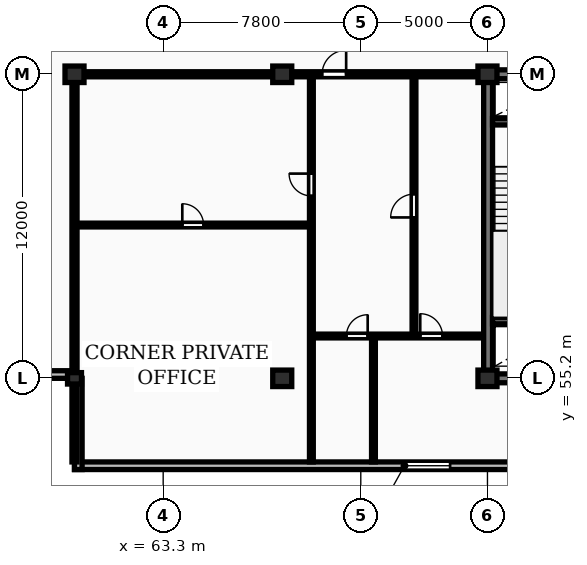
"""IFC4 building model, lengths in metres.
Left out: names, types, materials, properties, quantities, classifications, styles, units other than length and angle.
Written with IfcOpenShell. Run it as: python <this file> out.ifc"""

import sys

from ifc_helpers import new_model, si_unit, direction, frame, frame_2d, origin, origin_2d, place, context, subcontext, project, spatial, rectangle, extrude, element, fill, save


model = new_model("IFC4")
c1 = context("Model", 3, precision=1e-05, world=origin(), true_north=direction((0.0, 1.0)))
c2 = subcontext(c1, "Body", "Model", "MODEL_VIEW")
j1 = project(units=[si_unit("LENGTHUNIT", "METRE"), si_unit("PLANEANGLEUNIT", "RADIAN")], contexts=[c1])
p1 = place(None, origin())
s1 = spatial("IfcSite", under=j1, at=p1, CompositionType="ELEMENT")
p2 = place(p1, origin())
s2 = spatial("IfcBuilding", under=s1, at=p2, CompositionType="ELEMENT")
p3 = place(p2, frame((0.0, 0.0, 235.55)))
s3 = spatial("IfcBuildingStorey", under=s2, at=p3, CompositionType="ELEMENT", Elevation=235.55)
p4 = place(p3, frame((59.8, 55.2, 0.0), z_axis=(0.0, 0.0, 1.0), x_axis=(1.0, 0.0, 0.0)))
e1 = element("IfcColumn", 1, at=p4, inside=s3, PredefinedType="PILASTER", context=c2, shape_type="SweptSolid", body=[
    extrude(rectangle(XDim=0.55, YDim=0.45, at=origin_2d()), origin(), (0.0, 0.0, 1.0), 3.45),
])
for number, where, z_axis, x_axis in (
    (2, (59.8, 67.2, 0.0), (0.0, 0.0, 1.0), (1.0, 0.0, 0.0)),
    (3, (68.0, 55.2, 0.0), (0.0, 0.0, 1.0), (1.0, 0.0, 0.0)),
    (4, (68.0, 67.2, 0.0), (0.0, 0.0, 1.0), (1.0, 0.0, 0.0)),
    (5, (76.1, 55.2, 0.0), (0.0, 0.0, 1.0), (1.0, 0.0, 0.0)),
    (6, (76.1, 67.2, 0.0), (0.0, 0.0, 1.0), (1.0, 0.0, 0.0)),
):
    element("IfcColumn", number, at=place(p3, frame(where, z_axis=z_axis, x_axis=x_axis)), inside=s3, PredefinedType="COLUMN", context=c2, shape_type="SweptSolid", body=[
        extrude(rectangle(XDim=0.75, YDim=0.65, at=origin_2d()), origin(), (0.0, 0.0, 1.0), 3.45),
    ])
p5 = place(p3, frame((59.8, 51.75, 0.0), z_axis=(0.0, 0.0, 1.0), x_axis=(1.0, 0.0, 0.0)))
e7 = element("IfcWall", 7, at=p5, inside=s3, PredefinedType="STANDARD", context=c2, shape_type="SweptSolid", body=[
    extrude(rectangle(XDim=68.6, YDim=0.3, at=frame_2d((34.3, 0.0))), origin(), (0.0, 0.0, 1.0), 3.17),
])
p6 = place(p5, frame((13.025, 0.0, 0.85)))
e8 = element("IfcOpeningElement", 8, at=p6, cuts=e7, PredefinedType="OPENING", context=c2, shape_type="SweptSolid", body=[
    extrude(rectangle(XDim=1.8, YDim=1.8, at=frame_2d((0.9, 0.9))), frame((0.0, 0.16, 0.0), z_axis=(0.0, -1.0, 0.0), x_axis=(1.0, 0.0, 0.0)), (0.0, 0.0, 1.0), 0.32),
])
p7 = place(p5, frame((56.375, 0.0, 0.85)))
e9 = element("IfcOpeningElement", 9, at=p7, cuts=e7, PredefinedType="OPENING", context=c2, shape_type="SweptSolid", body=[
    extrude(rectangle(XDim=1.8, YDim=1.8, at=frame_2d((0.9, 0.9))), frame((0.0, 0.16, 0.0), z_axis=(0.0, -1.0, 0.0), x_axis=(1.0, 0.0, 0.0)), (0.0, 0.0, 1.0), 0.32),
])
p8 = place(p3, frame((56.2, 55.35, 0.0), z_axis=(0.0, 0.0, 1.0), x_axis=(1.0, 0.0, 0.0)))
e10 = element("IfcWall", 10, at=p8, inside=s3, PredefinedType="STANDARD", context=c2, shape_type="SweptSolid", body=[
    extrude(rectangle(XDim=3.6, YDim=0.3, at=frame_2d((1.8, 0.0))), origin(), (0.0, 0.0, 1.0), 3.17),
])
p9 = place(p3, frame((59.95, 55.2, 0.0), z_axis=(0.0, 0.0, 1.0), x_axis=(0.0, -1.0, 0.0)))
e11 = element("IfcWall", 11, at=p9, inside=s3, PredefinedType="STANDARD", context=c2, shape_type="SweptSolid", body=[
    extrude(rectangle(XDim=3.6, YDim=0.3, at=frame_2d((1.8, 0.0))), origin(), (0.0, 0.0, 1.0), 3.17),
])
p10 = place(p3, frame((75.95, 55.2, 0.0), z_axis=(0.0, 0.0, 1.0), x_axis=(1.0, 0.0, 0.0)))
e12 = element("IfcWall", 12, at=p10, inside=s3, PredefinedType="SHEAR", context=c2, shape_type="SweptSolid", body=[
    extrude(rectangle(XDim=36.3, YDim=0.35, at=frame_2d((18.15, 0.0))), origin(), (0.0, 0.0, 1.0), 3.45),
])
p11 = place(p3, frame((76.125, 55.375, 0.0), z_axis=(0.0, 0.0, 1.0), x_axis=(0.0, 1.0, 0.0)))
e13 = element("IfcWall", 13, at=p11, inside=s3, PredefinedType="SHEAR", context=c2, shape_type="SweptSolid", body=[
    extrude(rectangle(XDim=11.65, YDim=0.35, at=frame_2d((5.825, 0.0))), origin(), (0.0, 0.0, 1.0), 3.45),
])
p12 = place(p3, frame((75.95, 67.2, 0.0), z_axis=(0.0, 0.0, 1.0), x_axis=(1.0, 0.0, 0.0)))
e14 = element("IfcWall", 14, at=p12, inside=s3, PredefinedType="SHEAR", context=c2, shape_type="SweptSolid", body=[
    extrude(rectangle(XDim=36.3, YDim=0.35, at=frame_2d((18.15, 0.0))), origin(), (0.0, 0.0, 1.0), 3.45),
])
p13 = place(p12, frame((5.25, 0.0, 0.0)))
e15 = element("IfcOpeningElement", 15, at=p13, cuts=e14, PredefinedType="OPENING", context=c2, shape_type="SweptSolid", body=[
    extrude(rectangle(XDim=1.0, YDim=2.15, at=frame_2d((0.5, 1.075))), frame((0.0, 0.185, 0.0), z_axis=(0.0, -1.0, 0.0), x_axis=(1.0, 0.0, 0.0)), (0.0, 0.0, 1.0), 0.37),
])
p14 = place(p12, frame((21.6, 0.0, 0.0)))
e16 = element("IfcOpeningElement", 16, at=p14, cuts=e14, PredefinedType="OPENING", context=c2, shape_type="SweptSolid", body=[
    extrude(rectangle(XDim=1.5, YDim=2.2, at=frame_2d((0.75, 1.1))), frame((0.0, 0.185, 0.0), z_axis=(0.0, -1.0, 0.0), x_axis=(1.0, 0.0, 0.0)), (0.0, 0.0, 1.0), 0.37),
])
p15 = place(p12, frame((30.45, 0.0, 0.0)))
e17 = element("IfcOpeningElement", 17, at=p15, cuts=e14, PredefinedType="OPENING", context=c2, shape_type="SweptSolid", body=[
    extrude(rectangle(XDim=1.0, YDim=2.15, at=frame_2d((0.5, 1.075))), frame((0.0, 0.185, 0.0), z_axis=(0.0, -1.0, 0.0), x_axis=(1.0, 0.0, 0.0)), (0.0, 0.0, 1.0), 0.37),
])
for number, where, z_axis, x_axis in (
    (18, (76.3, 57.475, 0.0), (0.0, 0.0, 1.0), (1.0, 0.0, 0.0)),
    (19, (76.3, 65.325, 0.0), (0.0, 0.0, 1.0), (1.0, 0.0, 0.0)),
):
    element("IfcWall", number, at=place(p3, frame(where, z_axis=z_axis, x_axis=x_axis)), inside=s3, PredefinedType="SHEAR", context=c2, shape_type="SweptSolid", body=[
        extrude(rectangle(XDim=3.24, YDim=0.25, at=frame_2d((1.62, 0.0))), origin(), (0.0, 0.0, 1.0), 3.45),
    ])
p16 = place(p3, frame((59.8, 51.9, 0.0), z_axis=(0.0, 0.0, 1.0), x_axis=(0.0, 1.0, 0.0)))
e20 = element("IfcWall", 20, at=p16, inside=s3, PredefinedType="PARTITIONING", context=c2, shape_type="SweptSolid", body=[
    extrude(rectangle(XDim=15.3, YDim=0.2, at=frame_2d((7.65, 0.0))), origin(), (0.0, 0.0, 1.0), 2.477),
])
p17 = place(p3, frame((59.8, 61.25, 0.0), z_axis=(0.0, 0.0, 1.0), x_axis=(1.0, 0.0, 0.0)))
e21 = element("IfcWall", 21, at=p17, inside=s3, PredefinedType="PARTITIONING", context=c2, shape_type="SweptSolid", body=[
    extrude(rectangle(XDim=9.35, YDim=0.15, at=frame_2d((4.675, 0.0))), origin(), (0.0, 0.0, 1.0), 3.17),
])
p18 = place(p17, frame((4.255, 0.0, 0.0)))
e22 = element("IfcOpeningElement", 22, at=p18, cuts=e21, PredefinedType="OPENING", context=c2, shape_type="SweptSolid", body=[
    extrude(rectangle(XDim=0.84, YDim=2.04, at=frame_2d((0.42, 1.02))), frame((0.0, 0.085, 0.0), z_axis=(0.0, -1.0, 0.0), x_axis=(1.0, 0.0, 0.0)), (0.0, 0.0, 1.0), 0.17),
])
p19 = place(p3, frame((69.15, 51.9, 0.0), z_axis=(0.0, 0.0, 1.0), x_axis=(0.0, 1.0, 0.0)))
e23 = element("IfcWall", 23, at=p19, inside=s3, PredefinedType="PARTITIONING", context=c2, shape_type="SweptSolid", body=[
    extrude(rectangle(XDim=15.25, YDim=0.15, at=frame_2d((7.625, 0.0))), origin(), (0.0, 0.0, 1.0), 3.17),
])
p20 = place(p19, frame((10.5, 0.0, 0.0)))
e24 = element("IfcOpeningElement", 24, at=p20, cuts=e23, PredefinedType="OPENING", context=c2, shape_type="SweptSolid", body=[
    extrude(rectangle(XDim=0.88, YDim=2.06, at=frame_2d((0.44, 1.03))), frame((0.0, 0.085, 0.0), z_axis=(0.0, -1.0, 0.0), x_axis=(1.0, 0.0, 0.0)), (0.0, 0.0, 1.0), 0.17),
])
p21 = place(p3, frame((73.2, 56.87, 0.0), z_axis=(0.0, 0.0, 1.0), x_axis=(0.0, 1.0, 0.0)))
e25 = element("IfcWall", 25, at=p21, inside=s3, PredefinedType="PARTITIONING", context=c2, shape_type="SweptSolid", body=[
    extrude(rectangle(XDim=10.28, YDim=0.15, at=frame_2d((5.14, 0.0))), origin(), (0.0, 0.0, 1.0), 3.17),
])
p22 = place(p21, frame((4.68, 0.0, 0.0)))
e26 = element("IfcOpeningElement", 26, at=p22, cuts=e25, PredefinedType="OPENING", context=c2, shape_type="SweptSolid", body=[
    extrude(rectangle(XDim=0.92, YDim=2.08, at=frame_2d((0.46, 1.04))), frame((0.0, 0.085, 0.0), z_axis=(0.0, -1.0, 0.0), x_axis=(1.0, 0.0, 0.0)), (0.0, 0.0, 1.0), 0.17),
])
p23 = place(p3, frame((71.6, 51.9, 0.0), z_axis=(0.0, 0.0, 1.0), x_axis=(0.0, 1.0, 0.0)))
e27 = element("IfcWall", 27, at=p23, inside=s3, PredefinedType="PARTITIONING", context=c2, shape_type="SweptSolid", body=[
    extrude(rectangle(XDim=4.97, YDim=0.15, at=frame_2d((2.485, 0.0))), origin(), (0.0, 0.0, 1.0), 3.17),
])
p24 = place(p3, frame((69.17, 56.87, 0.0), z_axis=(0.0, 0.0, 1.0), x_axis=(1.0, 0.0, 0.0)))
e28 = element("IfcWall", 28, at=p24, inside=s3, PredefinedType="PARTITIONING", context=c2, shape_type="SweptSolid", body=[
    extrude(rectangle(XDim=6.76, YDim=0.15, at=frame_2d((3.38, 0.0))), origin(), (0.0, 0.0, 1.0), 3.17),
])
p25 = place(p24, frame((1.362, 0.0, 0.0)))
e29 = element("IfcOpeningElement", 29, at=p25, cuts=e28, PredefinedType="OPENING", context=c2, shape_type="SweptSolid", body=[
    extrude(rectangle(XDim=0.84, YDim=2.04, at=frame_2d((0.42, 1.02))), frame((0.0, 0.085, 0.0), z_axis=(0.0, -1.0, 0.0), x_axis=(1.0, 0.0, 0.0)), (0.0, 0.0, 1.0), 0.17),
])
p26 = place(p24, frame((4.277, 0.0, 0.0)))
e30 = element("IfcOpeningElement", 30, at=p26, cuts=e28, PredefinedType="OPENING", context=c2, shape_type="SweptSolid", body=[
    extrude(rectangle(XDim=0.88, YDim=2.06, at=frame_2d((0.44, 1.03))), frame((0.0, 0.085, 0.0), z_axis=(0.0, -1.0, 0.0), x_axis=(1.0, 0.0, 0.0)), (0.0, 0.0, 1.0), 0.17),
])
p27 = place(p3, frame((59.8, 67.2, 0.0), z_axis=(0.0, 0.0, 1.0), x_axis=(1.0, 0.0, 0.0)))
e31 = element("IfcWall", 31, at=p27, inside=s3, PredefinedType="PARTITIONING", context=c2, shape_type="SweptSolid", body=[
    extrude(rectangle(XDim=16.15, YDim=0.2, at=frame_2d((8.075, 0.0))), origin(), (0.0, 0.0, 1.0), 2.633),
])
p28 = place(p27, frame((9.772, 0.0, 0.0)))
e32 = element("IfcOpeningElement", 32, at=p28, cuts=e31, PredefinedType="OPENING", context=c2, shape_type="SweptSolid", body=[
    extrude(rectangle(XDim=0.95, YDim=2.15, at=frame_2d((0.475, 1.075))), frame((0.0, 0.11, 0.0), z_axis=(0.0, -1.0, 0.0), x_axis=(1.0, 0.0, 0.0)), (0.0, 0.0, 1.0), 0.22),
])
p29 = place(p6, origin())
e33 = element("IfcWindow", 33, at=p29, inside=s3, PartitioningType="SINGLE_PANEL", PredefinedType="WINDOW", context=c2, shape_type="SweptSolid", body=[
    extrude(rectangle(XDim=1.8, YDim=1.8, at=frame_2d((0.9, 0.9))), frame((0.0, 0.03, 0.0), z_axis=(0.0, -1.0, 0.0), x_axis=(1.0, 0.0, 0.0)), (0.0, 0.0, 1.0), 0.06),
])
fill(e8, e33)
p30 = place(p18, origin())
e34 = element("IfcDoor", 34, at=p30, inside=s3, OperationType="SINGLE_SWING_LEFT", PredefinedType="DOOR", context=c2, shape_type="SweptSolid", body=[
    extrude(rectangle(XDim=0.84, YDim=2.04, at=frame_2d((0.42, 1.02))), frame((0.0, 0.025, 0.0), z_axis=(0.0, -1.0, 0.0), x_axis=(1.0, 0.0, 0.0)), (0.0, 0.0, 1.0), 0.05),
])
fill(e22, e34)
p31 = place(p20, origin())
e35 = element("IfcDoor", 35, at=p31, inside=s3, OperationType="SINGLE_SWING_RIGHT", PredefinedType="DOOR", context=c2, shape_type="SweptSolid", body=[
    extrude(rectangle(XDim=0.88, YDim=2.06, at=frame_2d((0.44, 1.03))), frame((0.0, 0.025, 0.0), z_axis=(0.0, -1.0, 0.0), x_axis=(1.0, 0.0, 0.0)), (0.0, 0.0, 1.0), 0.05),
])
fill(e24, e35)
p32 = place(p22, origin())
e36 = element("IfcDoor", 36, at=p32, inside=s3, OperationType="SINGLE_SWING_LEFT", PredefinedType="DOOR", context=c2, shape_type="SweptSolid", body=[
    extrude(rectangle(XDim=0.92, YDim=2.08, at=frame_2d((0.46, 1.04))), frame((0.0, 0.025, 0.0), z_axis=(0.0, -1.0, 0.0), x_axis=(1.0, 0.0, 0.0)), (0.0, 0.0, 1.0), 0.05),
])
fill(e26, e36)
p33 = place(p25, origin())
e37 = element("IfcDoor", 37, at=p33, inside=s3, OperationType="SINGLE_SWING_RIGHT", PredefinedType="DOOR", context=c2, shape_type="SweptSolid", body=[
    extrude(rectangle(XDim=0.84, YDim=2.04, at=frame_2d((0.42, 1.02))), frame((0.0, 0.025, 0.0), z_axis=(0.0, -1.0, 0.0), x_axis=(1.0, 0.0, 0.0)), (0.0, 0.0, 1.0), 0.05),
])
fill(e29, e37)
p34 = place(p26, origin())
e38 = element("IfcDoor", 38, at=p34, inside=s3, OperationType="SINGLE_SWING_LEFT", PredefinedType="DOOR", context=c2, shape_type="SweptSolid", body=[
    extrude(rectangle(XDim=0.88, YDim=2.06, at=frame_2d((0.44, 1.03))), frame((0.0, 0.025, 0.0), z_axis=(0.0, -1.0, 0.0), x_axis=(1.0, 0.0, 0.0)), (0.0, 0.0, 1.0), 0.05),
])
fill(e30, e38)
p35 = place(p28, origin())
e39 = element("IfcDoor", 39, at=p35, inside=s3, OperationType="SINGLE_SWING_RIGHT", PredefinedType="DOOR", context=c2, shape_type="SweptSolid", body=[
    extrude(rectangle(XDim=0.95, YDim=2.15, at=frame_2d((0.475, 1.075))), frame((0.0, 0.025, 0.0), z_axis=(0.0, -1.0, 0.0), x_axis=(1.0, 0.0, 0.0)), (0.0, 0.0, 1.0), 0.05),
])
fill(e32, e39)
save(model, sys.argv[1])
